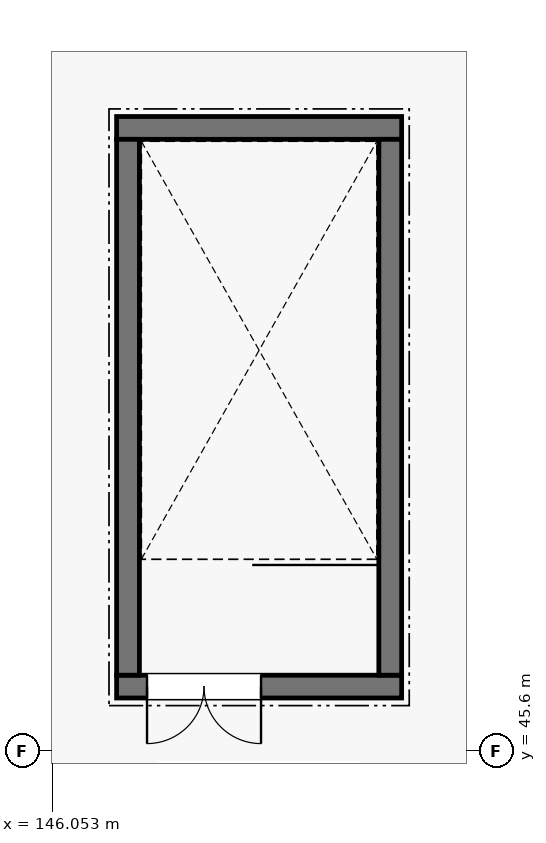
"""IFC4 building model, lengths in metres.
Left out: names, types, materials, properties, quantities, classifications, styles, units other than length and angle.
Written with IfcOpenShell. Run it as: python <this file> out.ifc"""

import sys

from ifc_helpers import new_model, si_unit, direction, frame, frame_2d, origin, place, context, subcontext, project, spatial, rectangle, extrude, element, fill, save


model = new_model("IFC4")
c1 = context("Model", 3, precision=1e-05, world=origin(), true_north=direction((0.0, 1.0)))
c2 = subcontext(c1, "Body", "Model", "MODEL_VIEW")
j1 = project(units=[si_unit("LENGTHUNIT", "METRE"), si_unit("PLANEANGLEUNIT", "RADIAN")], contexts=[c1])
p1 = place(None, origin())
s1 = spatial("IfcSite", under=j1, at=p1, CompositionType="ELEMENT")
p2 = place(p1, origin())
s2 = spatial("IfcBuilding", under=s1, at=p2, CompositionType="ELEMENT")
p3 = place(p2, frame((0.0, 0.0, 19.5)))
s3 = spatial("IfcBuildingStorey", under=s2, at=p3, CompositionType="ELEMENT", Elevation=19.5)
p4 = place(p3, frame((146.9, 46.45, 0.0), z_axis=(0.0, 0.0, 1.0), x_axis=(1.0, 0.0, 0.0)))
e1 = element("IfcWall", 1, at=p4, inside=s3, PredefinedType="SHEAR", context=c2, shape_type="SweptSolid", body=[
    extrude(rectangle(XDim=3.75, YDim=0.3, at=frame_2d((1.875, 0.0))), origin(), (0.0, 0.0, 1.0), 4.28),
])
p5 = place(p4, frame((0.4, 0.0, 0.0)))
e2 = element("IfcOpeningElement", 2, at=p5, cuts=e1, PredefinedType="OPENING", context=c2, shape_type="SweptSolid", body=[
    extrude(rectangle(XDim=1.5, YDim=2.2, at=frame_2d((0.75, 1.1))), frame((0.0, 0.16, 0.0), z_axis=(0.0, -1.0, 0.0), x_axis=(1.0, 0.0, 0.0)), (0.0, 0.0, 1.0), 0.32),
])
p6 = place(p3, frame((146.9, 53.8, 0.0), z_axis=(0.0, 0.0, 1.0), x_axis=(1.0, 0.0, 0.0)))
e3 = element("IfcWall", 3, at=p6, inside=s3, PredefinedType="SHEAR", context=c2, shape_type="SweptSolid", body=[
    extrude(rectangle(XDim=3.75, YDim=0.3, at=frame_2d((1.875, 0.0))), origin(), (0.0, 0.0, 1.0), 4.28),
])
for number, where, z_axis, x_axis in (
    (4, (147.05, 46.6, 0.0), (0.0, 0.0, 1.0), (0.0, 1.0, 0.0)),
    (5, (150.5, 46.6, 0.0), (0.0, 0.0, 1.0), (0.0, 1.0, 0.0)),
):
    element("IfcWall", number, at=place(p3, frame(where, z_axis=z_axis, x_axis=x_axis)), inside=s3, PredefinedType="SHEAR", context=c2, shape_type="SweptSolid", body=[
        extrude(rectangle(XDim=7.05, YDim=0.3, at=frame_2d((3.525, 0.0))), origin(), (0.0, 0.0, 1.0), 4.28),
    ])
p7 = place(p5, frame((1.5, 0.0, 0.0), z_axis=(0.0, 0.0, 1.0), x_axis=(-1.0, 0.0, 0.0)))
e6 = element("IfcDoor", 6, at=p7, inside=s3, OperationType="DOUBLE_DOOR_SINGLE_SWING", PredefinedType="DOOR", context=c2, shape_type="SweptSolid", body=[
    extrude(rectangle(XDim=1.5, YDim=2.2, at=frame_2d((0.75, 1.1))), frame((0.0, 0.025, 0.0), z_axis=(0.0, -1.0, 0.0), x_axis=(1.0, 0.0, 0.0)), (0.0, 0.0, 1.0), 0.05),
])
fill(e2, e6)
save(model, sys.argv[1])
